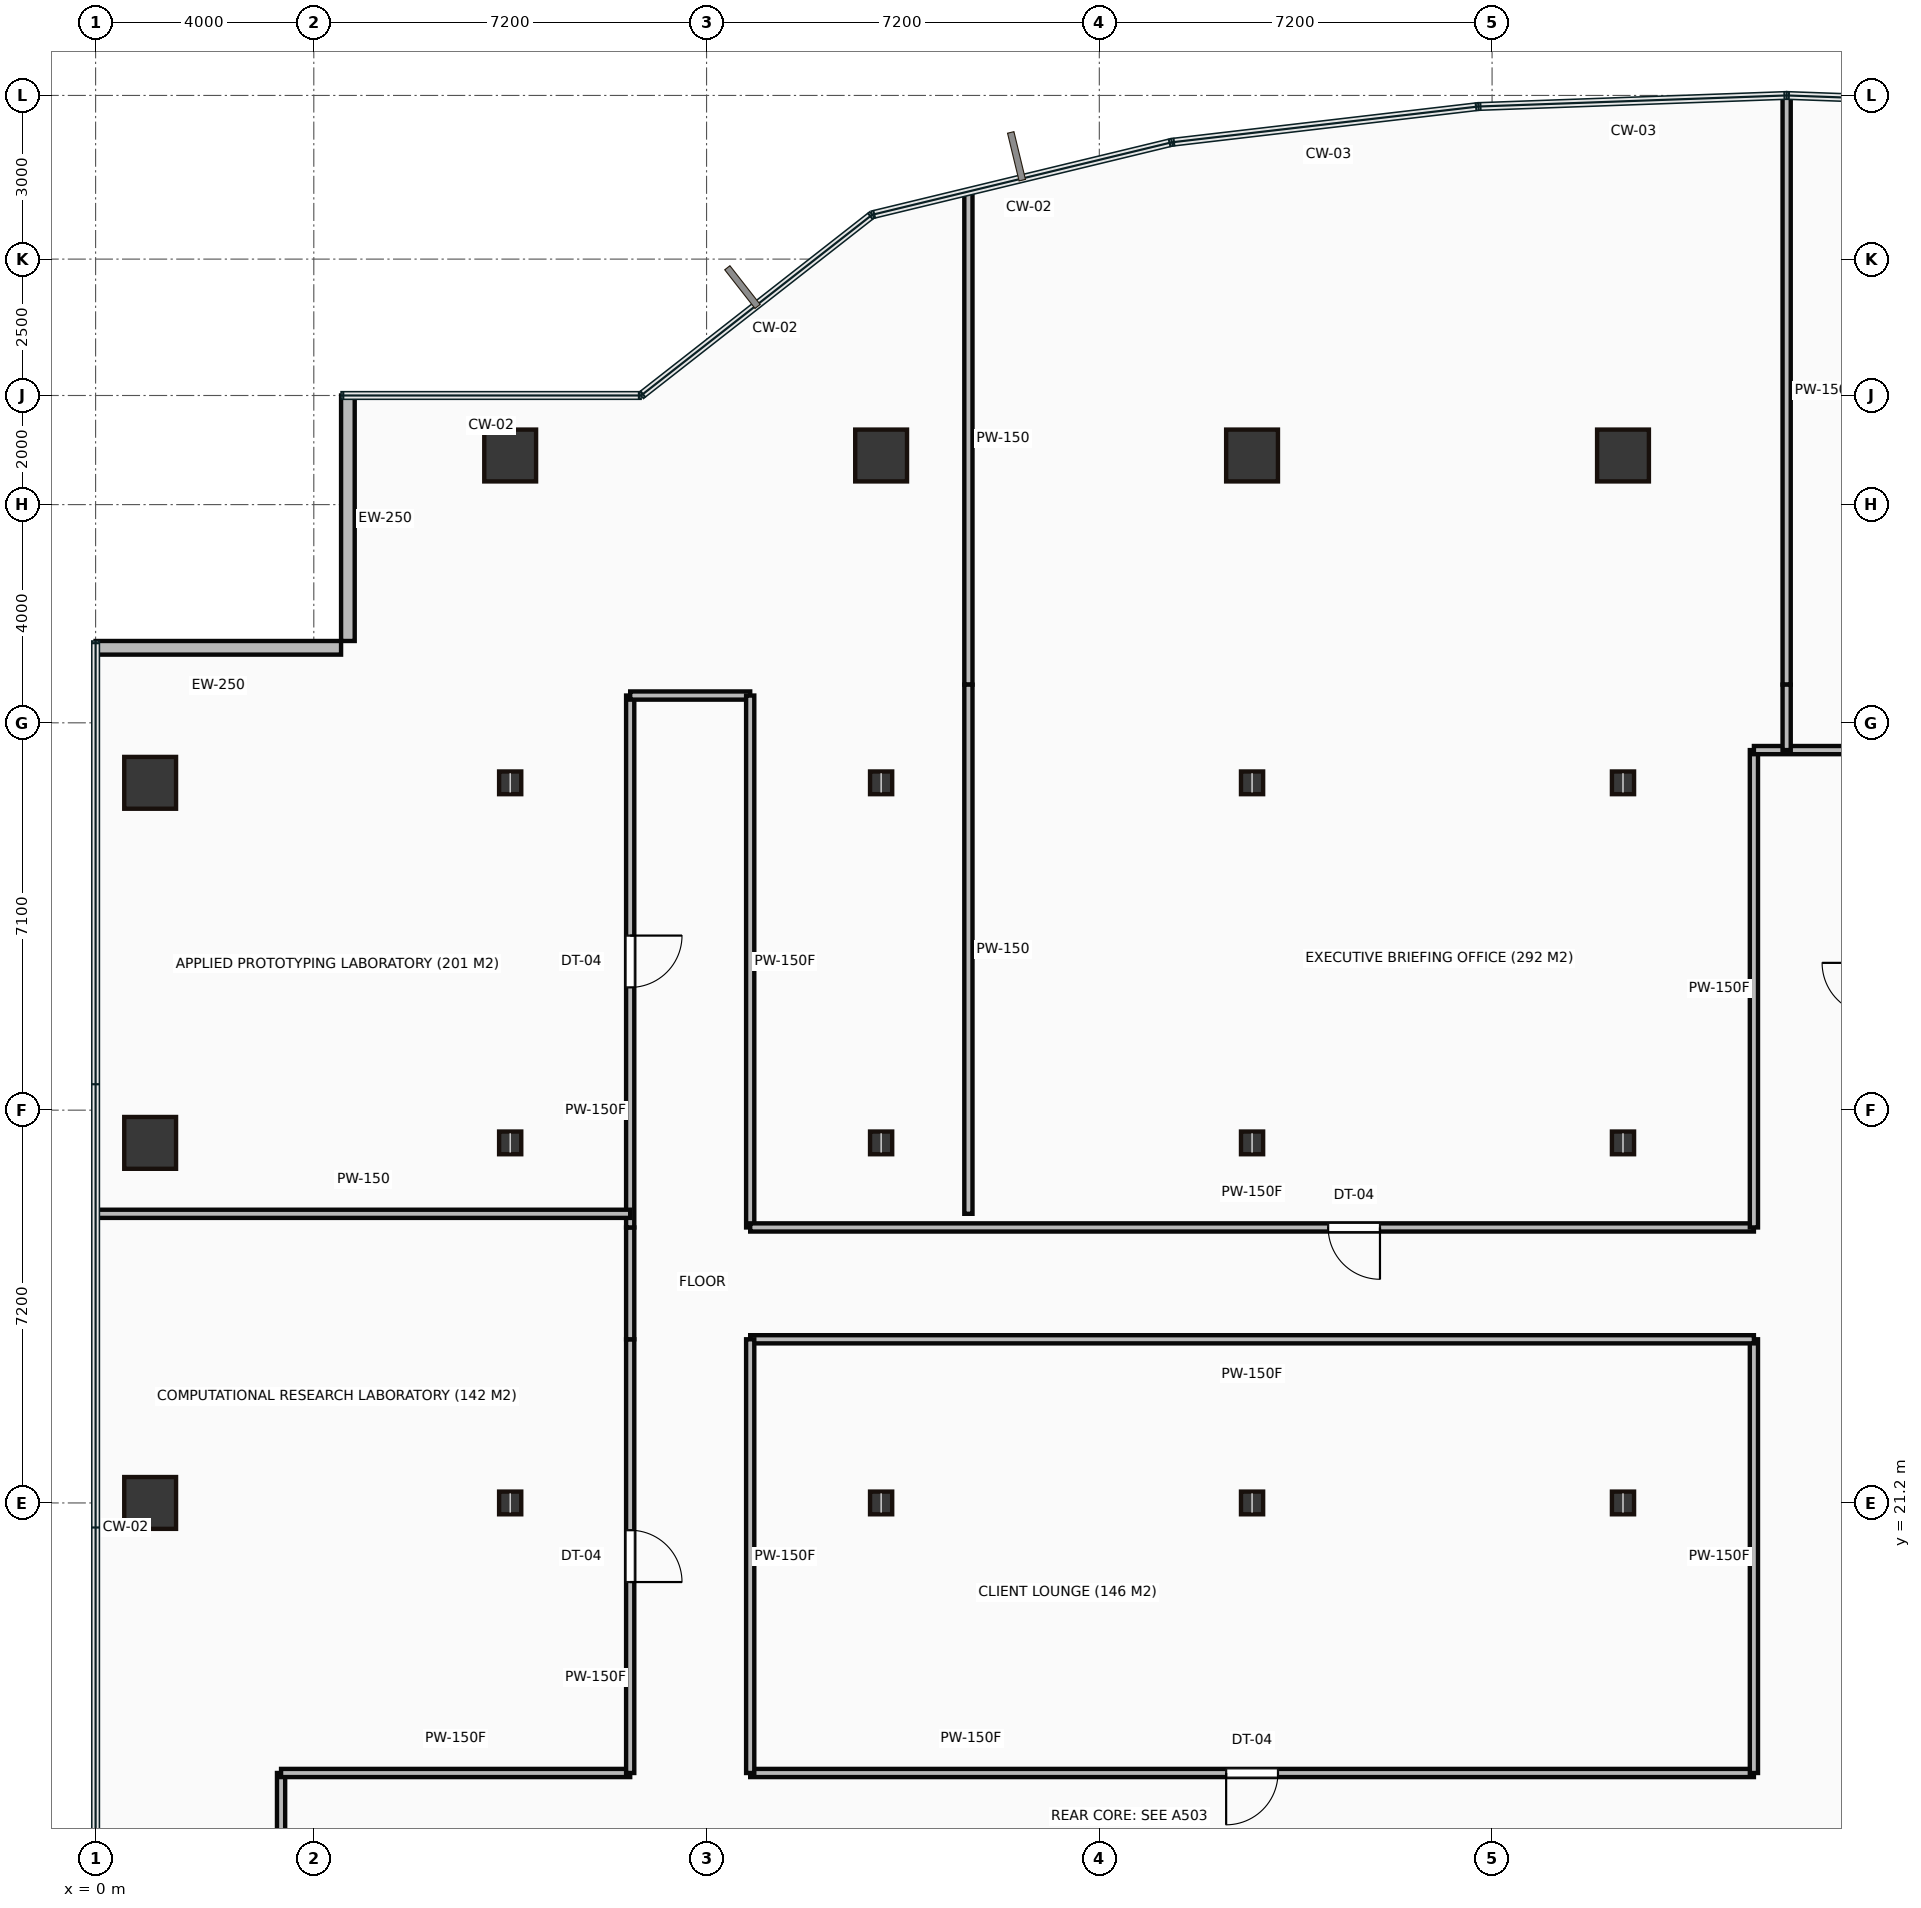
"""IFC4 building model, lengths in metres.
Left out: names, types, materials, properties, quantities, classifications, styles, units other than length and angle.
Written with IfcOpenShell. Run it as: python <this file> out.ifc"""

import sys

from ifc_helpers import new_model, si_unit, direction, frame, frame_2d, origin, origin_2d, place, context, subcontext, project, spatial, rectangle, hollow_rectangle, i_section, extrude, source, transform, mapped, element, fill, save


model = new_model("IFC4")
c1 = context("Model", 3, precision=1e-05, world=origin(), true_north=direction((0.0, 1.0)))
c2 = subcontext(c1, "Body", "Model", "MODEL_VIEW")
j1 = project(units=[si_unit("LENGTHUNIT", "METRE"), si_unit("PLANEANGLEUNIT", "RADIAN")], contexts=[c1])
p1 = place(None, origin())
s1 = spatial("IfcSite", under=j1, at=p1, CompositionType="ELEMENT")
p2 = place(p1, origin())
s2 = spatial("IfcBuilding", under=s1, at=p2, CompositionType="ELEMENT")
p3 = place(p2, frame((0.0, 0.0, 61.7)))
s3 = spatial("IfcBuildingStorey", under=s2, at=p3, CompositionType="ELEMENT", Elevation=61.7)
m1 = source(origin(), c2, "Body", "SweptSolid", [
    extrude(hollow_rectangle(XDim=0.95, YDim=0.95, WallThickness=0.045, at=origin_2d()), origin(), (0.0, 0.0, 1.0), 3.65),
])
for number, where, z_axis, x_axis in (
    (1, (1.0, 21.2, 0.0), (0.0, 0.0, 1.0), (1.0, 0.0, 0.0)),
    (2, (1.0, 27.8, 0.0), (0.0, 0.0, 1.0), (1.0, 0.0, 0.0)),
    (3, (1.0, 34.4, 0.0), (0.0, 0.0, 1.0), (1.0, 0.0, 0.0)),
):
    element("IfcColumn", number, at=place(p3, frame(where, z_axis=z_axis, x_axis=x_axis)), inside=s3, PredefinedType="COLUMN", context=c2, shape_type="MappedRepresentation", body=[
        mapped(m1, transform((0.0, 0.0, 0.0))),
    ])
m2 = source(origin(), c2, "Body", "SweptSolid", [
    extrude(i_section(OverallWidth=0.406, OverallDepth=0.416, WebThickness=0.03, FlangeThickness=0.048, at=origin_2d()), origin(), (0.0, 0.0, 1.0), 3.65),
])
for number, where, z_axis, x_axis in (
    (4, (7.6, 21.2, 0.0), (0.0, 0.0, 1.0), (1.0, 0.0, 0.0)),
    (5, (7.6, 27.8, 0.0), (0.0, 0.0, 1.0), (1.0, 0.0, 0.0)),
    (6, (7.6, 34.4, 0.0), (0.0, 0.0, 1.0), (1.0, 0.0, 0.0)),
):
    element("IfcColumn", number, at=place(p3, frame(where, z_axis=z_axis, x_axis=x_axis)), inside=s3, PredefinedType="COLUMN", context=c2, shape_type="MappedRepresentation", body=[
        mapped(m2, transform((0.0, 0.0, 0.0))),
    ])
p4 = place(p3, frame((7.6, 40.4, 0.0), z_axis=(0.0, 0.0, 1.0), x_axis=(1.0, 0.0, 0.0)))
e7 = element("IfcColumn", 7, at=p4, inside=s3, PredefinedType="COLUMN", context=c2, shape_type="MappedRepresentation", body=[
    mapped(m1, transform((0.0, 0.0, 0.0))),
])
for number, where, z_axis, x_axis in (
    (8, (14.4, 21.2, 0.0), (0.0, 0.0, 1.0), (1.0, 0.0, 0.0)),
    (9, (14.4, 27.8, 0.0), (0.0, 0.0, 1.0), (1.0, 0.0, 0.0)),
    (10, (14.4, 34.4, 0.0), (0.0, 0.0, 1.0), (1.0, 0.0, 0.0)),
):
    element("IfcColumn", number, at=place(p3, frame(where, z_axis=z_axis, x_axis=x_axis)), inside=s3, PredefinedType="COLUMN", context=c2, shape_type="MappedRepresentation", body=[
        mapped(m2, transform((0.0, 0.0, 0.0))),
    ])
p5 = place(p3, frame((14.4, 40.4, 0.0), z_axis=(0.0, 0.0, 1.0), x_axis=(1.0, 0.0, 0.0)))
e11 = element("IfcColumn", 11, at=p5, inside=s3, PredefinedType="COLUMN", context=c2, shape_type="MappedRepresentation", body=[
    mapped(m1, transform((0.0, 0.0, 0.0))),
])
for number, where, z_axis, x_axis in (
    (12, (21.2, 21.2, 0.0), (0.0, 0.0, 1.0), (1.0, 0.0, 0.0)),
    (13, (21.2, 27.8, 0.0), (0.0, 0.0, 1.0), (1.0, 0.0, 0.0)),
    (14, (21.2, 34.4, 0.0), (0.0, 0.0, 1.0), (1.0, 0.0, 0.0)),
):
    element("IfcColumn", number, at=place(p3, frame(where, z_axis=z_axis, x_axis=x_axis)), inside=s3, PredefinedType="COLUMN", context=c2, shape_type="MappedRepresentation", body=[
        mapped(m2, transform((0.0, 0.0, 0.0))),
    ])
p6 = place(p3, frame((21.2, 40.4, 0.0), z_axis=(0.0, 0.0, 1.0), x_axis=(1.0, 0.0, 0.0)))
e15 = element("IfcColumn", 15, at=p6, inside=s3, PredefinedType="COLUMN", context=c2, shape_type="MappedRepresentation", body=[
    mapped(m1, transform((0.0, 0.0, 0.0))),
])
for number, where, z_axis, x_axis in (
    (16, (28.0, 21.2, 0.0), (0.0, 0.0, 1.0), (1.0, 0.0, 0.0)),
    (17, (28.0, 27.8, 0.0), (0.0, 0.0, 1.0), (1.0, 0.0, 0.0)),
    (18, (28.0, 34.4, 0.0), (0.0, 0.0, 1.0), (1.0, 0.0, 0.0)),
):
    element("IfcColumn", number, at=place(p3, frame(where, z_axis=z_axis, x_axis=x_axis)), inside=s3, PredefinedType="COLUMN", context=c2, shape_type="MappedRepresentation", body=[
        mapped(m2, transform((0.0, 0.0, 0.0))),
    ])
p7 = place(p3, frame((28.0, 40.4, 0.0), z_axis=(0.0, 0.0, 1.0), x_axis=(1.0, 0.0, 0.0)))
e19 = element("IfcColumn", 19, at=p7, inside=s3, PredefinedType="COLUMN", context=c2, shape_type="MappedRepresentation", body=[
    mapped(m1, transform((0.0, 0.0, 0.0))),
])
m3 = source(origin(), c2, "Body", "SweptSolid", [
    extrude(rectangle(XDim=4.5, YDim=0.25, at=frame_2d((2.25, 0.0))), origin(), (0.0, 0.0, 1.0), 3.4),
])
for number, where, z_axis, x_axis in (
    (20, (4.625, 41.5, 0.0), (0.0, 0.0, 1.0), (0.0, -1.0, 0.0)),
    (21, (4.5, 36.875, 0.0), (0.0, 0.0, 1.0), (-1.0, 0.0, 0.0)),
):
    element("IfcWall", number, at=place(p3, frame(where, z_axis=z_axis, x_axis=x_axis)), inside=s3, PredefinedType="STANDARD", context=c2, shape_type="MappedRepresentation", body=[
        mapped(m3, transform((0.0, 0.0, 0.0))),
    ])
m4 = source(origin(), c2, "Body", "SweptSolid", [
    extrude(rectangle(XDim=2.25, YDim=0.15, at=frame_2d((1.125, 0.0))), origin(), (0.0, 0.0, 1.0), 3.4),
])
p8 = place(p3, frame((3.4, 14.0, 0.0), z_axis=(0.0, 0.0, 1.0), x_axis=(0.0, 1.0, 0.0)))
e22 = element("IfcWall", 22, at=p8, inside=s3, PredefinedType="PARTITIONING", context=c2, shape_type="MappedRepresentation", body=[
    mapped(m4, transform((0.0, 0.0, 0.0))),
])
m5 = source(origin(), c2, "Body", "SweptSolid", [
    extrude(rectangle(XDim=6.4, YDim=0.15, at=frame_2d((3.2, 0.0))), origin(), (0.0, 0.0, 1.0), 3.4),
])
p9 = place(p3, frame((3.4, 16.25, 0.0), z_axis=(0.0, 0.0, 1.0), x_axis=(1.0, 0.0, 0.0)))
e23 = element("IfcWall", 23, at=p9, inside=s3, PredefinedType="PARTITIONING", context=c2, shape_type="MappedRepresentation", body=[
    mapped(m5, transform((0.0, 0.0, 0.0))),
])
m6 = source(origin(), c2, "Body", "SweptSolid", [
    extrude(rectangle(XDim=7.95, YDim=0.15, at=frame_2d((3.975, 0.0))), origin(), (0.0, 0.0, 1.0), 3.4),
])
p10 = place(p3, frame((9.8, 16.25, 0.0), z_axis=(0.0, 0.0, 1.0), x_axis=(0.0, 1.0, 0.0)))
e24 = element("IfcWall", 24, at=p10, inside=s3, PredefinedType="PARTITIONING", context=c2, shape_type="MappedRepresentation", body=[
    mapped(m6, transform((0.0, 0.0, 0.0))),
])
p11 = place(p10, frame((3.5, 0.0, 0.0)))
e25 = element("IfcOpeningElement", 25, at=p11, cuts=e24, PredefinedType="OPENING", context=c2, shape_type="SweptSolid", body=[
    extrude(rectangle(XDim=0.95, YDim=2.15, at=frame_2d((0.475, 1.075))), frame((0.0, 0.085, 0.0), z_axis=(0.0, -1.0, 0.0), x_axis=(1.0, 0.0, 0.0)), (0.0, 0.0, 1.0), 0.17),
])
m7 = source(origin(), c2, "Body", "SweptSolid", [
    extrude(rectangle(XDim=2.05, YDim=0.15, at=frame_2d((1.025, 0.0))), origin(), (0.0, 0.0, 1.0), 3.4),
])
p12 = place(p3, frame((9.8, 24.2, 0.0), z_axis=(0.0, 0.0, 1.0), x_axis=(0.0, 1.0, 0.0)))
e26 = element("IfcWall", 26, at=p12, inside=s3, PredefinedType="PARTITIONING", context=c2, shape_type="MappedRepresentation", body=[
    mapped(m7, transform((0.0, 0.0, 0.0))),
])
m8 = source(origin(), c2, "Body", "SweptSolid", [
    extrude(rectangle(XDim=9.75, YDim=0.15, at=frame_2d((4.875, 0.0))), origin(), (0.0, 0.0, 1.0), 3.4),
])
p13 = place(p3, frame((9.8, 26.25, 0.0), z_axis=(0.0, 0.0, 1.0), x_axis=(0.0, 1.0, 0.0)))
e27 = element("IfcWall", 27, at=p13, inside=s3, PredefinedType="PARTITIONING", context=c2, shape_type="MappedRepresentation", body=[
    mapped(m8, transform((0.0, 0.0, 0.0))),
])
p14 = place(p13, frame((4.4, 0.0, 0.0)))
e28 = element("IfcOpeningElement", 28, at=p14, cuts=e27, PredefinedType="OPENING", context=c2, shape_type="SweptSolid", body=[
    extrude(rectangle(XDim=0.95, YDim=2.15, at=frame_2d((0.475, 1.075))), frame((0.0, 0.085, 0.0), z_axis=(0.0, -1.0, 0.0), x_axis=(1.0, 0.0, 0.0)), (0.0, 0.0, 1.0), 0.17),
])
m9 = source(origin(), c2, "Body", "SweptSolid", [
    extrude(rectangle(XDim=2.2, YDim=0.15, at=frame_2d((1.1, 0.0))), origin(), (0.0, 0.0, 1.0), 3.4),
])
p15 = place(p3, frame((9.8, 36.0, 0.0), z_axis=(0.0, 0.0, 1.0), x_axis=(1.0, 0.0, 0.0)))
e29 = element("IfcWall", 29, at=p15, inside=s3, PredefinedType="PARTITIONING", context=c2, shape_type="MappedRepresentation", body=[
    mapped(m9, transform((0.0, 0.0, 0.0))),
])
p16 = place(p3, frame((12.0, 36.0, 0.0), z_axis=(0.0, 0.0, 1.0), x_axis=(0.0, -1.0, 0.0)))
e30 = element("IfcWall", 30, at=p16, inside=s3, PredefinedType="PARTITIONING", context=c2, shape_type="MappedRepresentation", body=[
    mapped(m8, transform((0.0, 0.0, 0.0))),
])
m10 = source(origin(), c2, "Body", "SweptSolid", [
    extrude(rectangle(XDim=18.4, YDim=0.15, at=frame_2d((9.2, 0.0))), origin(), (0.0, 0.0, 1.0), 3.4),
])
p17 = place(p3, frame((12.0, 26.25, 0.0), z_axis=(0.0, 0.0, 1.0), x_axis=(1.0, 0.0, 0.0)))
e31 = element("IfcWall", 31, at=p17, inside=s3, PredefinedType="PARTITIONING", context=c2, shape_type="MappedRepresentation", body=[
    mapped(m10, transform((0.0, 0.0, 0.0))),
])
p18 = place(p17, frame((10.595, 0.0, 0.0)))
e32 = element("IfcOpeningElement", 32, at=p18, cuts=e31, PredefinedType="OPENING", context=c2, shape_type="SweptSolid", body=[
    extrude(rectangle(XDim=0.95, YDim=2.15, at=frame_2d((0.475, 1.075))), frame((0.0, 0.085, 0.0), z_axis=(0.0, -1.0, 0.0), x_axis=(1.0, 0.0, 0.0)), (0.0, 0.0, 1.0), 0.17),
])
m11 = source(origin(), c2, "Body", "SweptSolid", [
    extrude(rectangle(XDim=8.75, YDim=0.15, at=frame_2d((4.375, 0.0))), origin(), (0.0, 0.0, 1.0), 3.4),
])
p19 = place(p3, frame((30.4, 26.25, 0.0), z_axis=(0.0, 0.0, 1.0), x_axis=(0.0, 1.0, 0.0)))
e33 = element("IfcWall", 33, at=p19, inside=s3, PredefinedType="PARTITIONING", context=c2, shape_type="MappedRepresentation", body=[
    mapped(m11, transform((0.0, 0.0, 0.0))),
])
m12 = source(origin(), c2, "Body", "SweptSolid", [
    extrude(rectangle(XDim=2.2, YDim=0.15, at=frame_2d((1.1, 0.0))), origin(), (0.0, 0.0, 1.0), 3.4),
])
p20 = place(p3, frame((30.4, 35.0, 0.0), z_axis=(0.0, 0.0, 1.0), x_axis=(1.0, 0.0, 0.0)))
e34 = element("IfcWall", 34, at=p20, inside=s3, PredefinedType="PARTITIONING", context=c2, shape_type="MappedRepresentation", body=[
    mapped(m12, transform((0.0, 0.0, 0.0))),
])
p21 = place(p3, frame((12.0, 16.25, 0.0), z_axis=(0.0, 0.0, 1.0), x_axis=(1.0, 0.0, 0.0)))
e35 = element("IfcWall", 35, at=p21, inside=s3, PredefinedType="PARTITIONING", context=c2, shape_type="MappedRepresentation", body=[
    mapped(m10, transform((0.0, 0.0, 0.0))),
])
p22 = place(p21, frame((8.725, 0.0, 0.0)))
e36 = element("IfcOpeningElement", 36, at=p22, cuts=e35, PredefinedType="OPENING", context=c2, shape_type="SweptSolid", body=[
    extrude(rectangle(XDim=0.95, YDim=2.15, at=frame_2d((0.475, 1.075))), frame((0.0, 0.085, 0.0), z_axis=(0.0, -1.0, 0.0), x_axis=(1.0, 0.0, 0.0)), (0.0, 0.0, 1.0), 0.17),
])
p23 = place(p3, frame((30.4, 16.25, 0.0), z_axis=(0.0, 0.0, 1.0), x_axis=(0.0, 1.0, 0.0)))
e37 = element("IfcWall", 37, at=p23, inside=s3, PredefinedType="PARTITIONING", context=c2, shape_type="MappedRepresentation", body=[
    mapped(m6, transform((0.0, 0.0, 0.0))),
])
p24 = place(p3, frame((30.4, 24.2, 0.0), z_axis=(0.0, 0.0, 1.0), x_axis=(-1.0, 0.0, 0.0)))
e38 = element("IfcWall", 38, at=p24, inside=s3, PredefinedType="PARTITIONING", context=c2, shape_type="MappedRepresentation", body=[
    mapped(m10, transform((0.0, 0.0, 0.0))),
])
p25 = place(p3, frame((12.0, 24.2, 0.0), z_axis=(0.0, 0.0, 1.0), x_axis=(0.0, -1.0, 0.0)))
e39 = element("IfcWall", 39, at=p25, inside=s3, PredefinedType="PARTITIONING", context=c2, shape_type="MappedRepresentation", body=[
    mapped(m6, transform((0.0, 0.0, 0.0))),
])
m13 = source(origin(), c2, "Body", "SweptSolid", [
    extrude(rectangle(XDim=9.78, YDim=0.15, at=frame_2d((4.89, 0.0))), origin(), (0.0, 0.0, 1.0), 3.4),
])
p26 = place(p3, frame((0.02, 26.5, 0.0), z_axis=(0.0, 0.0, 1.0), x_axis=(1.0, 0.0, 0.0)))
e40 = element("IfcWall", 40, at=p26, inside=s3, PredefinedType="PARTITIONING", context=c2, shape_type="MappedRepresentation", body=[
    mapped(m13, transform((0.0, 0.0, 0.0))),
])
m14 = source(origin(), c2, "Body", "SweptSolid", [
    extrude(rectangle(XDim=9.018, YDim=0.15, at=frame_2d((4.509, 0.0))), origin(), (0.0, 0.0, 1.0), 3.4),
])
p27 = place(p3, frame((16.0, 45.218, 0.0), z_axis=(0.0, 0.0, 1.0), x_axis=(0.0, -1.0, 0.0)))
e41 = element("IfcWall", 41, at=p27, inside=s3, PredefinedType="PARTITIONING", context=c2, shape_type="MappedRepresentation", body=[
    mapped(m14, transform((0.0, 0.0, 0.0))),
])
m15 = source(origin(), c2, "Body", "SweptSolid", [
    extrude(rectangle(XDim=9.7, YDim=0.15, at=frame_2d((4.85, 0.0))), origin(), (0.0, 0.0, 1.0), 3.4),
])
p28 = place(p3, frame((16.0, 36.2, 0.0), z_axis=(0.0, 0.0, 1.0), x_axis=(0.0, -1.0, 0.0)))
e42 = element("IfcWall", 42, at=p28, inside=s3, PredefinedType="PARTITIONING", context=c2, shape_type="MappedRepresentation", body=[
    mapped(m15, transform((0.0, 0.0, 0.0))),
])
m16 = source(origin(), c2, "Body", "SweptSolid", [
    extrude(rectangle(XDim=10.78, YDim=0.15, at=frame_2d((5.39, 0.0))), origin(), (0.0, 0.0, 1.0), 3.4),
])
p29 = place(p3, frame((31.0, 46.98, 0.0), z_axis=(0.0, 0.0, 1.0), x_axis=(0.0, -1.0, 0.0)))
e43 = element("IfcWall", 43, at=p29, inside=s3, PredefinedType="PARTITIONING", context=c2, shape_type="MappedRepresentation", body=[
    mapped(m16, transform((0.0, 0.0, 0.0))),
])
m17 = source(origin(), c2, "Body", "SweptSolid", [
    extrude(rectangle(XDim=1.2, YDim=0.15, at=frame_2d((0.6, 0.0))), origin(), (0.0, 0.0, 1.0), 3.4),
])
p30 = place(p3, frame((31.0, 36.2, 0.0), z_axis=(0.0, 0.0, 1.0), x_axis=(0.0, -1.0, 0.0)))
e44 = element("IfcWall", 44, at=p30, inside=s3, PredefinedType="PARTITIONING", context=c2, shape_type="MappedRepresentation", body=[
    mapped(m17, transform((0.0, 0.0, 0.0))),
])
m18 = source(origin(), c2, "Body", "SweptSolid", [
    extrude(rectangle(XDim=0.95, YDim=2.15, at=frame_2d((0.475, 1.075))), frame((0.0, 0.025, 0.0), z_axis=(0.0, -1.0, 0.0), x_axis=(1.0, 0.0, 0.0)), (0.0, 0.0, 1.0), 0.05),
])
p31 = place(p11, origin())
e45 = element("IfcDoor", 45, at=p31, inside=s3, OperationType="SINGLE_SWING_LEFT", PredefinedType="DOOR", context=c2, shape_type="MappedRepresentation", body=[
    mapped(m18, transform((0.0, 0.0, 0.0))),
])
fill(e25, e45)
p32 = place(p14, origin())
e46 = element("IfcDoor", 46, at=p32, inside=s3, OperationType="SINGLE_SWING_RIGHT", PredefinedType="DOOR", context=c2, shape_type="MappedRepresentation", body=[
    mapped(m18, transform((0.0, 0.0, 0.0))),
])
fill(e28, e46)
p33 = place(p22, origin())
e47 = element("IfcDoor", 47, at=p33, inside=s3, OperationType="SINGLE_SWING_LEFT", PredefinedType="DOOR", context=c2, shape_type="MappedRepresentation", body=[
    mapped(m18, transform((0.0, 0.0, 0.0))),
])
fill(e36, e47)
p34 = place(p18, origin())
e48 = element("IfcDoor", 48, at=p34, inside=s3, OperationType="SINGLE_SWING_RIGHT", PredefinedType="DOOR", context=c2, shape_type="MappedRepresentation", body=[
    mapped(m18, transform((0.0, 0.0, 0.0))),
])
fill(e32, e48)
save(model, sys.argv[1])
